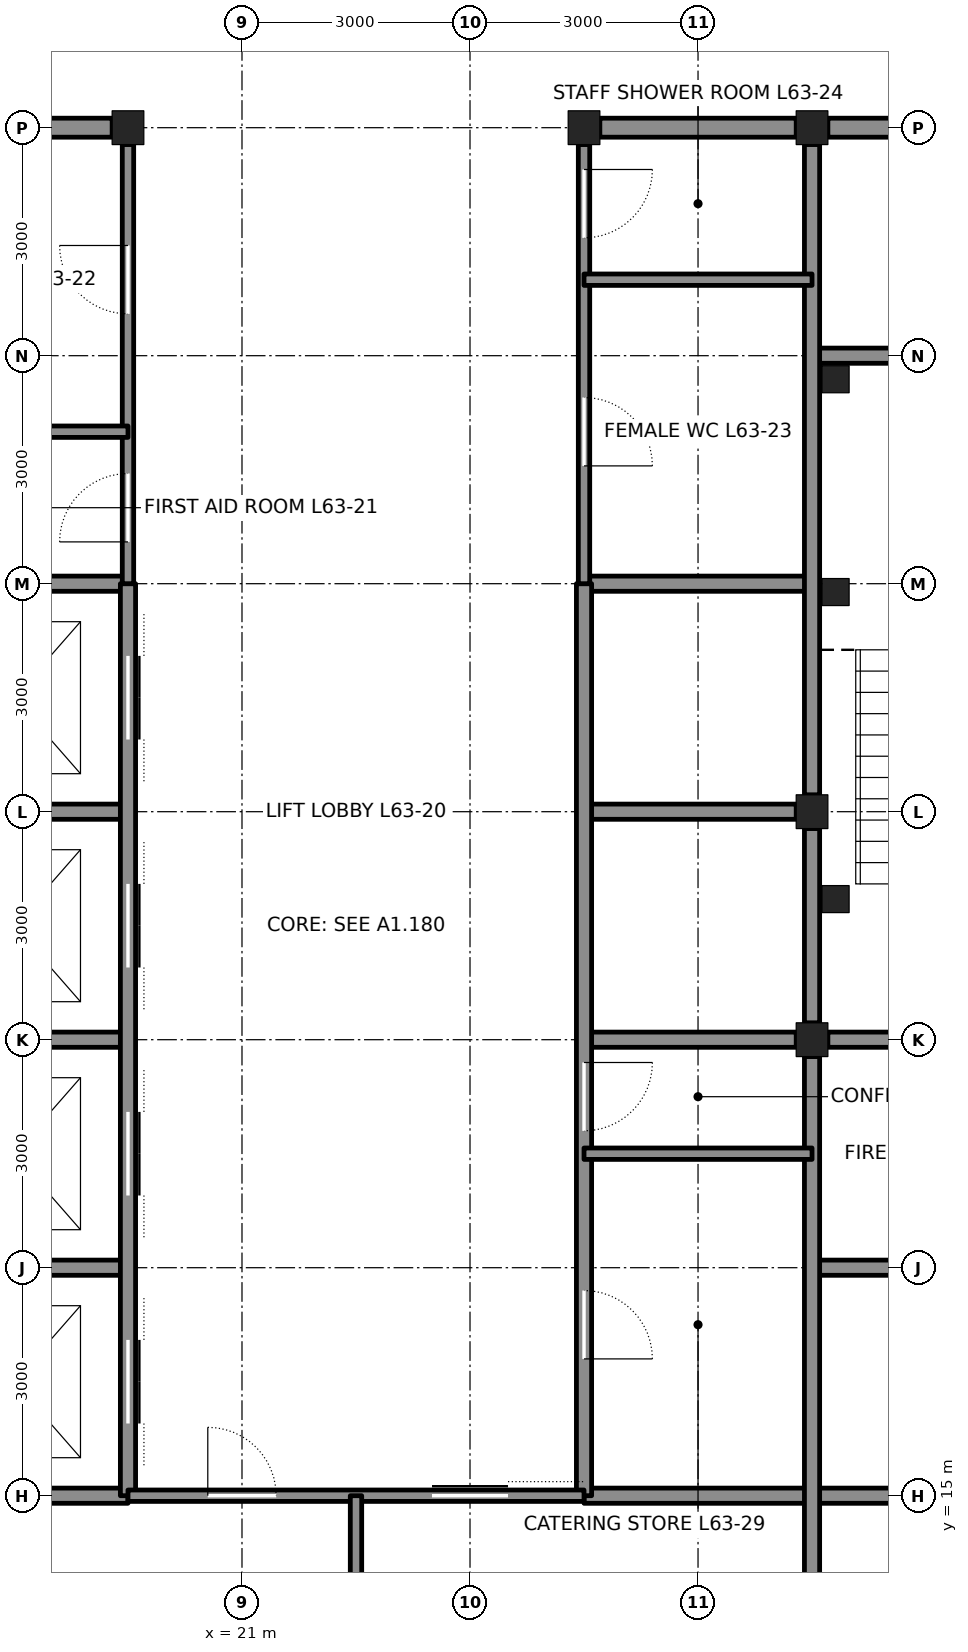
"""IFC4 building model, lengths in metres.
Left out: names, types, materials, properties, quantities, classifications, styles, units other than length and angle.
Written with IfcOpenShell. Run it as: python <this file> out.ifc"""

import sys

from ifc_helpers import new_model, si_unit, direction, frame, frame_2d, origin, origin_2d, place, context, subcontext, project, spatial, rectangle, hollow_rectangle, i_section, extrude, element, fill, save


model = new_model("IFC4")
c1 = context("Model", 3, precision=1e-05, world=origin(), true_north=direction((0.0, 1.0)))
c2 = subcontext(c1, "Body", "Model", "MODEL_VIEW")
j1 = project(units=[si_unit("LENGTHUNIT", "METRE"), si_unit("PLANEANGLEUNIT", "RADIAN")], contexts=[c1])
p1 = place(None, origin())
s1 = spatial("IfcSite", under=j1, at=p1, CompositionType="ELEMENT")
p2 = place(p1, origin())
s2 = spatial("IfcBuilding", under=s1, at=p2, CompositionType="ELEMENT")
p3 = place(p2, frame((0.0, 0.0, 283.2)))
s3 = spatial("IfcBuildingStorey", under=s2, at=p3, CompositionType="ELEMENT", Elevation=283.2)
for number, where, z_axis, x_axis in (
    (1, (19.5, 33.0, 0.0), (0.0, 0.0, 1.0), (1.0, 0.0, 0.0)),
    (2, (25.5, 33.0, 0.0), (0.0, 0.0, 1.0), (1.0, 0.0, 0.0)),
    (3, (28.5, 33.0, 0.0), (0.0, 0.0, 1.0), (1.0, 0.0, 0.0)),
    (4, (28.5, 21.0, 0.0), (0.0, 0.0, 1.0), (1.0, 0.0, 0.0)),
    (5, (28.5, 24.0, 0.0), (0.0, 0.0, 1.0), (1.0, 0.0, 0.0)),
):
    element("IfcColumn", number, at=place(p3, frame(where, z_axis=z_axis, x_axis=x_axis)), inside=s3, PredefinedType="COLUMN", context=c2, shape_type="SweptSolid", body=[
        extrude(i_section(OverallWidth=0.417, OverallDepth=0.445, WebThickness=0.039, FlangeThickness=0.063, at=origin_2d()), origin(), (0.0, 0.0, 1.0), 4.2),
    ])
for number, where, z_axis, x_axis in (
    (6, (12.0, 15.0, 0.0), (0.0, 0.0, 1.0), (1.0, 0.0, 0.0)),
    (7, (25.5, 15.0, 0.0), (0.0, 0.0, 1.0), (1.0, 0.0, 0.0)),
):
    element("IfcWall", number, at=place(p3, frame(where, z_axis=z_axis, x_axis=x_axis)), inside=s3, PredefinedType="SOLIDWALL", context=c2, shape_type="SweptSolid", body=[
        extrude(rectangle(XDim=7.5, YDim=0.2, at=frame_2d((3.75, 0.0))), origin(), (0.0, 0.0, 1.0), 4.04),
    ])
for number, where, z_axis, x_axis in (
    (8, (16.708, 24.0, 0.0), (0.0, 0.0, 1.0), (1.0, 0.0, 0.0)),
    (9, (25.5, 24.0, 0.0), (0.0, 0.0, 1.0), (1.0, 0.0, 0.0)),
):
    element("IfcWall", number, at=place(p3, frame(where, z_axis=z_axis, x_axis=x_axis)), inside=s3, PredefinedType="SOLIDWALL", context=c2, shape_type="SweptSolid", body=[
        extrude(rectangle(XDim=2.792, YDim=0.2, at=frame_2d((1.396, 0.0))), origin(), (0.0, 0.0, 1.0), 3.09),
    ])
p4 = place(p3, frame((12.0, 27.0, 0.0), z_axis=(0.0, 0.0, 1.0), x_axis=(1.0, 0.0, 0.0)))
e10 = element("IfcWall", 10, at=p4, inside=s3, PredefinedType="SOLIDWALL", context=c2, shape_type="SweptSolid", body=[
    extrude(rectangle(XDim=7.5, YDim=0.2, at=frame_2d((3.75, 0.0))), origin(), (0.0, 0.0, 1.0), 4.04),
])
p5 = place(p4, frame((1.65, 0.0, 0.0)))
e11 = element("IfcOpeningElement", 11, at=p5, cuts=e10, PredefinedType="OPENING", context=c2, shape_type="SweptSolid", body=[
    extrude(rectangle(XDim=1.2, YDim=2.1, at=frame_2d((0.6, 1.05))), frame((0.0, 0.11, 0.0), z_axis=(0.0, -1.0, 0.0), x_axis=(1.0, 0.0, 0.0)), (0.0, 0.0, 1.0), 0.22),
])
p6 = place(p3, frame((25.5, 27.0, 0.0), z_axis=(0.0, 0.0, 1.0), x_axis=(1.0, 0.0, 0.0)))
e12 = element("IfcWall", 12, at=p6, inside=s3, PredefinedType="SOLIDWALL", context=c2, shape_type="SweptSolid", body=[
    extrude(rectangle(XDim=3.0, YDim=0.2, at=frame_2d((1.5, 0.0))), origin(), (0.0, 0.0, 1.0), 4.04),
])
p7 = place(p3, frame((28.5, 30.0, 0.0), z_axis=(0.0, 0.0, 1.0), x_axis=(1.0, 0.0, 0.0)))
e13 = element("IfcWall", 13, at=p7, inside=s3, PredefinedType="SOLIDWALL", context=c2, shape_type="SweptSolid", body=[
    extrude(rectangle(XDim=4.5, YDim=0.2, at=frame_2d((2.25, 0.0))), origin(), (0.0, 0.0, 1.0), 4.04),
])
for number, where, z_axis, x_axis in (
    (14, (16.708, 33.0, 0.0), (0.0, 0.0, 1.0), (1.0, 0.0, 0.0)),
    (15, (25.708, 33.0, 0.0), (0.0, 0.0, 1.0), (1.0, 0.0, 0.0)),
):
    element("IfcWall", number, at=place(p3, frame(where, z_axis=z_axis, x_axis=x_axis)), inside=s3, PredefinedType="SOLIDWALL", context=c2, shape_type="SweptSolid", body=[
        extrude(rectangle(XDim=2.583, YDim=0.25, at=frame_2d((1.292, 0.0))), origin(), (0.0, 0.0, 1.0), 3.182),
    ])
p8 = place(p3, frame((28.708, 33.0, 0.0), z_axis=(0.0, 0.0, 1.0), x_axis=(1.0, 0.0, 0.0)))
e16 = element("IfcWall", 16, at=p8, inside=s3, PredefinedType="SOLIDWALL", context=c2, shape_type="SweptSolid", body=[
    extrude(rectangle(XDim=4.042, YDim=0.25, at=frame_2d((2.021, 0.0))), origin(), (0.0, 0.0, 1.0), 3.182),
])
p9 = place(p3, frame((16.5, 18.0, 0.0), z_axis=(0.0, 0.0, 1.0), x_axis=(1.0, 0.0, 0.0)))
e17 = element("IfcWall", 17, at=p9, inside=s3, PredefinedType="SOLIDWALL", context=c2, shape_type="SweptSolid", body=[
    extrude(rectangle(XDim=3.0, YDim=0.2, at=frame_2d((1.5, 0.0))), origin(), (0.0, 0.0, 1.0), 4.04),
])
p10 = place(p3, frame((28.5, 18.0, 0.0), z_axis=(0.0, 0.0, 1.0), x_axis=(1.0, 0.0, 0.0)))
e18 = element("IfcWall", 18, at=p10, inside=s3, PredefinedType="SOLIDWALL", context=c2, shape_type="SweptSolid", body=[
    extrude(rectangle(XDim=4.5, YDim=0.2, at=frame_2d((2.25, 0.0))), origin(), (0.0, 0.0, 1.0), 4.04),
])
p11 = place(p10, frame((1.65, 0.0, 0.0)))
e19 = element("IfcOpeningElement", 19, at=p11, cuts=e18, PredefinedType="OPENING", context=c2, shape_type="SweptSolid", body=[
    extrude(rectangle(XDim=1.2, YDim=2.1, at=frame_2d((0.6, 1.05))), frame((0.0, 0.11, 0.0), z_axis=(0.0, -1.0, 0.0), x_axis=(1.0, 0.0, 0.0)), (0.0, 0.0, 1.0), 0.22),
])
for number, where, z_axis, x_axis in (
    (20, (16.708, 21.0, 0.0), (0.0, 0.0, 1.0), (1.0, 0.0, 0.0)),
    (21, (25.5, 21.0, 0.0), (0.0, 0.0, 1.0), (1.0, 0.0, 0.0)),
):
    element("IfcWall", number, at=place(p3, frame(where, z_axis=z_axis, x_axis=x_axis)), inside=s3, PredefinedType="SOLIDWALL", context=c2, shape_type="SweptSolid", body=[
        extrude(rectangle(XDim=2.792, YDim=0.2, at=frame_2d((1.396, 0.0))), origin(), (0.0, 0.0, 1.0), 3.09),
    ])
p12 = place(p3, frame((28.708, 21.0, 0.0), z_axis=(0.0, 0.0, 1.0), x_axis=(1.0, 0.0, 0.0)))
e22 = element("IfcWall", 22, at=p12, inside=s3, PredefinedType="SOLIDWALL", context=c2, shape_type="SweptSolid", body=[
    extrude(rectangle(XDim=4.083, YDim=0.2, at=frame_2d((2.042, 0.0))), origin(), (0.0, 0.0, 1.0), 3.09),
])
p13 = place(p12, frame((1.442, 0.0, 0.0)))
e23 = element("IfcOpeningElement", 23, at=p13, cuts=e22, PredefinedType="OPENING", context=c2, shape_type="SweptSolid", body=[
    extrude(rectangle(XDim=1.2, YDim=2.1, at=frame_2d((0.6, 1.05))), frame((0.0, 0.11, 0.0), z_axis=(0.0, -1.0, 0.0), x_axis=(1.0, 0.0, 0.0)), (0.0, 0.0, 1.0), 0.22),
])
p14 = place(p3, frame((19.5, 15.0, 0.0), z_axis=(0.0, 0.0, 1.0), x_axis=(0.0, 1.0, 0.0)))
e24 = element("IfcWall", 24, at=p14, inside=s3, PredefinedType="SOLIDWALL", context=c2, shape_type="SweptSolid", body=[
    extrude(rectangle(XDim=12.0, YDim=0.2, at=frame_2d((6.0, 0.0))), origin(), (0.0, 0.0, 1.0), 3.065),
])
p15 = place(p14, frame((0.95, 0.0, 0.0)))
e25 = element("IfcOpeningElement", 25, at=p15, cuts=e24, PredefinedType="OPENING", context=c2, shape_type="SweptSolid", body=[
    extrude(rectangle(XDim=1.1, YDim=2.1, at=frame_2d((0.55, 1.05))), frame((0.0, 0.11, 0.0), z_axis=(0.0, -1.0, 0.0), x_axis=(1.0, 0.0, 0.0)), (0.0, 0.0, 1.0), 0.22),
])
p16 = place(p14, frame((3.95, 0.0, 0.0)))
e26 = element("IfcOpeningElement", 26, at=p16, cuts=e24, PredefinedType="OPENING", context=c2, shape_type="SweptSolid", body=[
    extrude(rectangle(XDim=1.1, YDim=2.1, at=frame_2d((0.55, 1.05))), frame((0.0, 0.11, 0.0), z_axis=(0.0, -1.0, 0.0), x_axis=(1.0, 0.0, 0.0)), (0.0, 0.0, 1.0), 0.22),
])
p17 = place(p14, frame((6.95, 0.0, 0.0)))
e27 = element("IfcOpeningElement", 27, at=p17, cuts=e24, PredefinedType="OPENING", context=c2, shape_type="SweptSolid", body=[
    extrude(rectangle(XDim=1.1, YDim=2.1, at=frame_2d((0.55, 1.05))), frame((0.0, 0.11, 0.0), z_axis=(0.0, -1.0, 0.0), x_axis=(1.0, 0.0, 0.0)), (0.0, 0.0, 1.0), 0.22),
])
p18 = place(p14, frame((9.95, 0.0, 0.0)))
e28 = element("IfcOpeningElement", 28, at=p18, cuts=e24, PredefinedType="OPENING", context=c2, shape_type="SweptSolid", body=[
    extrude(rectangle(XDim=1.1, YDim=2.1, at=frame_2d((0.55, 1.05))), frame((0.0, 0.11, 0.0), z_axis=(0.0, -1.0, 0.0), x_axis=(1.0, 0.0, 0.0)), (0.0, 0.0, 1.0), 0.22),
])
p19 = place(p3, frame((19.5, 27.0, 0.0), z_axis=(0.0, 0.0, 1.0), x_axis=(0.0, 1.0, 0.0)))
e29 = element("IfcWall", 29, at=p19, inside=s3, PredefinedType="PARTITIONING", context=c2, shape_type="SweptSolid", body=[
    extrude(rectangle(XDim=5.778, YDim=0.15, at=frame_2d((2.889, 0.0))), origin(), (0.0, 0.0, 1.0), 3.065),
])
p20 = place(p19, frame((0.55, 0.0, 0.0)))
e30 = element("IfcOpeningElement", 30, at=p20, cuts=e29, PredefinedType="OPENING", context=c2, shape_type="SweptSolid", body=[
    extrude(rectangle(XDim=0.9, YDim=2.1, at=frame_2d((0.45, 1.05))), frame((0.0, 0.085, 0.0), z_axis=(0.0, -1.0, 0.0), x_axis=(1.0, 0.0, 0.0)), (0.0, 0.0, 1.0), 0.17),
])
p21 = place(p19, frame((3.55, 0.0, 0.0)))
e31 = element("IfcOpeningElement", 31, at=p21, cuts=e29, PredefinedType="OPENING", context=c2, shape_type="SweptSolid", body=[
    extrude(rectangle(XDim=0.9, YDim=2.1, at=frame_2d((0.45, 1.05))), frame((0.0, 0.085, 0.0), z_axis=(0.0, -1.0, 0.0), x_axis=(1.0, 0.0, 0.0)), (0.0, 0.0, 1.0), 0.17),
])
p22 = place(p3, frame((25.5, 15.0, 0.0), z_axis=(0.0, 0.0, 1.0), x_axis=(0.0, 1.0, 0.0)))
e32 = element("IfcWall", 32, at=p22, inside=s3, PredefinedType="SOLIDWALL", context=c2, shape_type="SweptSolid", body=[
    extrude(rectangle(XDim=12.0, YDim=0.2, at=frame_2d((6.0, 0.0))), origin(), (0.0, 0.0, 1.0), 3.065),
])
p23 = place(p22, frame((1.8, 0.0, 0.0)))
e33 = element("IfcOpeningElement", 33, at=p23, cuts=e32, PredefinedType="OPENING", context=c2, shape_type="SweptSolid", body=[
    extrude(rectangle(XDim=0.9, YDim=2.1, at=frame_2d((0.45, 1.05))), frame((0.0, 0.11, 0.0), z_axis=(0.0, -1.0, 0.0), x_axis=(1.0, 0.0, 0.0)), (0.0, 0.0, 1.0), 0.22),
])
p24 = place(p22, frame((4.8, 0.0, 0.0)))
e34 = element("IfcOpeningElement", 34, at=p24, cuts=e32, PredefinedType="OPENING", context=c2, shape_type="SweptSolid", body=[
    extrude(rectangle(XDim=0.9, YDim=2.1, at=frame_2d((0.45, 1.05))), frame((0.0, 0.11, 0.0), z_axis=(0.0, -1.0, 0.0), x_axis=(1.0, 0.0, 0.0)), (0.0, 0.0, 1.0), 0.22),
])
p25 = place(p3, frame((25.5, 27.0, 0.0), z_axis=(0.0, 0.0, 1.0), x_axis=(0.0, 1.0, 0.0)))
e35 = element("IfcWall", 35, at=p25, inside=s3, PredefinedType="PARTITIONING", context=c2, shape_type="SweptSolid", body=[
    extrude(rectangle(XDim=5.778, YDim=0.15, at=frame_2d((2.889, 0.0))), origin(), (0.0, 0.0, 1.0), 3.065),
])
p26 = place(p25, frame((1.55, 0.0, 0.0)))
e36 = element("IfcOpeningElement", 36, at=p26, cuts=e35, PredefinedType="OPENING", context=c2, shape_type="SweptSolid", body=[
    extrude(rectangle(XDim=0.9, YDim=2.1, at=frame_2d((0.45, 1.05))), frame((0.0, 0.085, 0.0), z_axis=(0.0, -1.0, 0.0), x_axis=(1.0, 0.0, 0.0)), (0.0, 0.0, 1.0), 0.17),
])
p27 = place(p25, frame((4.55, 0.0, 0.0)))
e37 = element("IfcOpeningElement", 37, at=p27, cuts=e35, PredefinedType="OPENING", context=c2, shape_type="SweptSolid", body=[
    extrude(rectangle(XDim=0.9, YDim=2.1, at=frame_2d((0.45, 1.05))), frame((0.0, 0.085, 0.0), z_axis=(0.0, -1.0, 0.0), x_axis=(1.0, 0.0, 0.0)), (0.0, 0.0, 1.0), 0.17),
])
p28 = place(p3, frame((28.5, 12.222, 0.0), z_axis=(0.0, 0.0, 1.0), x_axis=(0.0, 1.0, 0.0)))
e38 = element("IfcWall", 38, at=p28, inside=s3, PredefinedType="SOLIDWALL", context=c2, shape_type="SweptSolid", body=[
    extrude(rectangle(XDim=8.555, YDim=0.2, at=frame_2d((4.278, 0.0))), origin(), (0.0, 0.0, 1.0), 3.113),
])
p29 = place(p3, frame((28.5, 21.222, 0.0), z_axis=(0.0, 0.0, 1.0), x_axis=(0.0, 1.0, 0.0)))
e39 = element("IfcWall", 39, at=p29, inside=s3, PredefinedType="SOLIDWALL", context=c2, shape_type="SweptSolid", body=[
    extrude(rectangle(XDim=2.555, YDim=0.2, at=frame_2d((1.278, 0.0))), origin(), (0.0, 0.0, 1.0), 3.113),
])
p30 = place(p3, frame((28.5, 24.222, 0.0), z_axis=(0.0, 0.0, 1.0), x_axis=(0.0, 1.0, 0.0)))
e40 = element("IfcWall", 40, at=p30, inside=s3, PredefinedType="SOLIDWALL", context=c2, shape_type="SweptSolid", body=[
    extrude(rectangle(XDim=8.555, YDim=0.2, at=frame_2d((4.278, 0.0))), origin(), (0.0, 0.0, 1.0), 3.113),
])
p31 = place(p3, frame((19.5, 15.0, 0.0), z_axis=(0.0, 0.0, 1.0), x_axis=(1.0, 0.0, 0.0)))
e41 = element("IfcWall", 41, at=p31, inside=s3, PredefinedType="PARTITIONING", context=c2, shape_type="SweptSolid", body=[
    extrude(rectangle(XDim=6.0, YDim=0.15, at=frame_2d((3.0, 0.0))), origin(), (0.0, 0.0, 1.0), 4.04),
])
p32 = place(p31, frame((4.0, 0.0, 0.0)))
e42 = element("IfcOpeningElement", 42, at=p32, cuts=e41, PredefinedType="OPENING", context=c2, shape_type="SweptSolid", body=[
    extrude(rectangle(XDim=1.0, YDim=2.1, at=frame_2d((0.5, 1.05))), frame((0.0, 0.085, 0.0), z_axis=(0.0, -1.0, 0.0), x_axis=(1.0, 0.0, 0.0)), (0.0, 0.0, 1.0), 0.17),
])
p33 = place(p31, frame((1.05, 0.0, 0.0)))
e43 = element("IfcOpeningElement", 43, at=p33, cuts=e41, PredefinedType="OPENING", context=c2, shape_type="SweptSolid", body=[
    extrude(rectangle(XDim=0.9, YDim=2.1, at=frame_2d((0.45, 1.05))), frame((0.0, 0.085, 0.0), z_axis=(0.0, -1.0, 0.0), x_axis=(1.0, 0.0, 0.0)), (0.0, 0.0, 1.0), 0.17),
])
for number, where, z_axis, x_axis in (
    (44, (22.5, 15.0, 0.0), (0.0, 0.0, 1.0), (0.0, -1.0, 0.0)),
    (45, (16.5, 29.0, 0.0), (0.0, 0.0, 1.0), (1.0, 0.0, 0.0)),
    (46, (25.5, 31.0, 0.0), (0.0, 0.0, 1.0), (1.0, 0.0, 0.0)),
    (47, (25.5, 19.5, 0.0), (0.0, 0.0, 1.0), (1.0, 0.0, 0.0)),
):
    element("IfcWall", number, at=place(p3, frame(where, z_axis=z_axis, x_axis=x_axis)), inside=s3, PredefinedType="PARTITIONING", context=c2, shape_type="SweptSolid", body=[
        extrude(rectangle(XDim=3.0, YDim=0.15, at=frame_2d((1.5, 0.0))), origin(), (0.0, 0.0, 1.0), 4.04),
    ])
for number, where, z_axis, x_axis in (
    (48, (28.81, 29.69, 0.0), (0.0, 0.0, 1.0), (1.0, 0.0, 0.0)),
    (49, (28.81, 26.89, 0.0), (0.0, 0.0, 1.0), (1.0, 0.0, 0.0)),
    (50, (28.81, 22.85, 0.0), (0.0, 0.0, 1.0), (1.0, 0.0, 0.0)),
):
    element("IfcColumn", number, at=place(p3, frame(where, z_axis=z_axis, x_axis=x_axis)), inside=s3, PredefinedType="COLUMN", context=c2, shape_type="SweptSolid", body=[
        extrude(hollow_rectangle(XDim=0.356, YDim=0.356, WallThickness=0.009, at=origin_2d()), origin(), (0.0, 0.0, 1.0), 4.2),
    ])
p34 = place(p20, origin())
e51 = element("IfcDoor", 51, at=p34, inside=s3, OperationType="SINGLE_SWING_LEFT", PredefinedType="DOOR", context=c2, shape_type="SweptSolid", body=[
    extrude(rectangle(XDim=0.9, YDim=2.1, at=frame_2d((0.45, 1.05))), frame((0.0, 0.025, 0.0), z_axis=(0.0, -1.0, 0.0), x_axis=(1.0, 0.0, 0.0)), (0.0, 0.0, 1.0), 0.05),
])
fill(e30, e51)
p35 = place(p21, origin())
e52 = element("IfcDoor", 52, at=p35, inside=s3, OperationType="SINGLE_SWING_RIGHT", PredefinedType="DOOR", context=c2, shape_type="SweptSolid", body=[
    extrude(rectangle(XDim=0.9, YDim=2.1, at=frame_2d((0.45, 1.05))), frame((0.0, 0.025, 0.0), z_axis=(0.0, -1.0, 0.0), x_axis=(1.0, 0.0, 0.0)), (0.0, 0.0, 1.0), 0.05),
])
fill(e31, e52)
p36 = place(p26, frame((0.9, 0.0, 0.0), z_axis=(0.0, 0.0, 1.0), x_axis=(-1.0, 0.0, 0.0)))
e53 = element("IfcDoor", 53, at=p36, inside=s3, OperationType="SINGLE_SWING_RIGHT", PredefinedType="DOOR", context=c2, shape_type="SweptSolid", body=[
    extrude(rectangle(XDim=0.9, YDim=2.1, at=frame_2d((0.45, 1.05))), frame((0.0, 0.025, 0.0), z_axis=(0.0, -1.0, 0.0), x_axis=(1.0, 0.0, 0.0)), (0.0, 0.0, 1.0), 0.05),
])
fill(e36, e53)
p37 = place(p27, frame((0.9, 0.0, 0.0), z_axis=(0.0, 0.0, 1.0), x_axis=(-1.0, 0.0, 0.0)))
e54 = element("IfcDoor", 54, at=p37, inside=s3, OperationType="SINGLE_SWING_LEFT", PredefinedType="DOOR", context=c2, shape_type="SweptSolid", body=[
    extrude(rectangle(XDim=0.9, YDim=2.1, at=frame_2d((0.45, 1.05))), frame((0.0, 0.025, 0.0), z_axis=(0.0, -1.0, 0.0), x_axis=(1.0, 0.0, 0.0)), (0.0, 0.0, 1.0), 0.05),
])
fill(e37, e54)
p38 = place(p32, origin())
e55 = element("IfcDoor", 55, at=p38, inside=s3, OperationType="SLIDING_TO_LEFT", PredefinedType="DOOR", context=c2, shape_type="SweptSolid", body=[
    extrude(rectangle(XDim=1.0, YDim=2.1, at=frame_2d((0.5, 1.05))), frame((0.0, 0.025, 0.0), z_axis=(0.0, -1.0, 0.0), x_axis=(1.0, 0.0, 0.0)), (0.0, 0.0, 1.0), 0.05),
])
fill(e42, e55)
p39 = place(p23, frame((0.9, 0.0, 0.0), z_axis=(0.0, 0.0, 1.0), x_axis=(-1.0, 0.0, 0.0)))
e56 = element("IfcDoor", 56, at=p39, inside=s3, OperationType="SINGLE_SWING_RIGHT", PredefinedType="DOOR", context=c2, shape_type="SweptSolid", body=[
    extrude(rectangle(XDim=0.9, YDim=2.1, at=frame_2d((0.45, 1.05))), frame((0.0, 0.025, 0.0), z_axis=(0.0, -1.0, 0.0), x_axis=(1.0, 0.0, 0.0)), (0.0, 0.0, 1.0), 0.05),
])
fill(e33, e56)
p40 = place(p24, frame((0.9, 0.0, 0.0), z_axis=(0.0, 0.0, 1.0), x_axis=(-1.0, 0.0, 0.0)))
e57 = element("IfcDoor", 57, at=p40, inside=s3, OperationType="SINGLE_SWING_LEFT", PredefinedType="DOOR", context=c2, shape_type="SweptSolid", body=[
    extrude(rectangle(XDim=0.9, YDim=2.1, at=frame_2d((0.45, 1.05))), frame((0.0, 0.025, 0.0), z_axis=(0.0, -1.0, 0.0), x_axis=(1.0, 0.0, 0.0)), (0.0, 0.0, 1.0), 0.05),
])
fill(e34, e57)
p41 = place(p33, origin())
e58 = element("IfcDoor", 58, at=p41, inside=s3, OperationType="SINGLE_SWING_LEFT", PredefinedType="DOOR", context=c2, shape_type="SweptSolid", body=[
    extrude(rectangle(XDim=0.9, YDim=2.1, at=frame_2d((0.45, 1.05))), frame((0.0, 0.025, 0.0), z_axis=(0.0, -1.0, 0.0), x_axis=(1.0, 0.0, 0.0)), (0.0, 0.0, 1.0), 0.05),
])
fill(e43, e58)
p42 = place(p15, origin())
e59 = element("IfcDoor", 59, at=p42, inside=s3, OperationType="DOUBLE_DOOR_SLIDING", PredefinedType="DOOR", context=c2, shape_type="SweptSolid", body=[
    extrude(rectangle(XDim=1.1, YDim=2.1, at=frame_2d((0.55, 1.05))), frame((0.0, 0.025, 0.0), z_axis=(0.0, -1.0, 0.0), x_axis=(1.0, 0.0, 0.0)), (0.0, 0.0, 1.0), 0.05),
])
fill(e25, e59)
p43 = place(p16, origin())
e60 = element("IfcDoor", 60, at=p43, inside=s3, OperationType="DOUBLE_DOOR_SLIDING", PredefinedType="DOOR", context=c2, shape_type="SweptSolid", body=[
    extrude(rectangle(XDim=1.1, YDim=2.1, at=frame_2d((0.55, 1.05))), frame((0.0, 0.025, 0.0), z_axis=(0.0, -1.0, 0.0), x_axis=(1.0, 0.0, 0.0)), (0.0, 0.0, 1.0), 0.05),
])
fill(e26, e60)
p44 = place(p17, origin())
e61 = element("IfcDoor", 61, at=p44, inside=s3, OperationType="DOUBLE_DOOR_SLIDING", PredefinedType="DOOR", context=c2, shape_type="SweptSolid", body=[
    extrude(rectangle(XDim=1.1, YDim=2.1, at=frame_2d((0.55, 1.05))), frame((0.0, 0.025, 0.0), z_axis=(0.0, -1.0, 0.0), x_axis=(1.0, 0.0, 0.0)), (0.0, 0.0, 1.0), 0.05),
])
fill(e27, e61)
p45 = place(p18, origin())
e62 = element("IfcDoor", 62, at=p45, inside=s3, OperationType="DOUBLE_DOOR_SLIDING", PredefinedType="DOOR", context=c2, shape_type="SweptSolid", body=[
    extrude(rectangle(XDim=1.1, YDim=2.1, at=frame_2d((0.55, 1.05))), frame((0.0, 0.025, 0.0), z_axis=(0.0, -1.0, 0.0), x_axis=(1.0, 0.0, 0.0)), (0.0, 0.0, 1.0), 0.05),
])
fill(e28, e62)
save(model, sys.argv[1])
